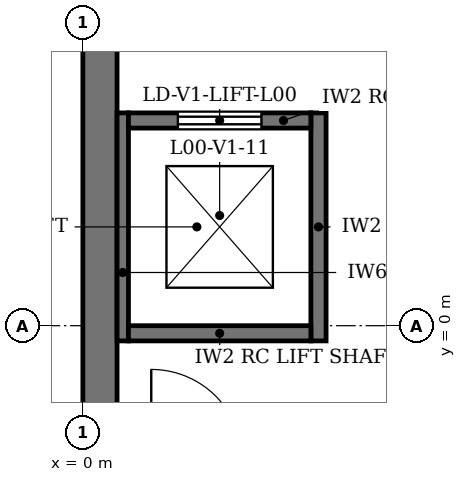
"""IFC4 building model, lengths in metres.
Left out: names, types, materials, properties, quantities, classifications, styles, units other than length and angle.
Written with IfcOpenShell. Run it as: python <this file> out.ifc"""

import sys

from ifc_helpers import new_model, si_unit, direction, frame, frame_2d, origin, place, context, subcontext, project, spatial, rectangle, extrude, element, fill, save


model = new_model("IFC4")
c1 = context("Model", 3, precision=1e-05, world=origin(), true_north=direction((0.0, 1.0)))
c2 = subcontext(c1, "Body", "Model", "MODEL_VIEW")
j1 = project(units=[si_unit("LENGTHUNIT", "METRE"), si_unit("PLANEANGLEUNIT", "RADIAN")], contexts=[c1])
p1 = place(None, origin())
s1 = spatial("IfcSite", under=j1, at=p1, CompositionType="ELEMENT")
p2 = place(p1, origin())
s2 = spatial("IfcBuilding", under=s1, at=p2, CompositionType="ELEMENT")
p3 = place(p2, origin())
s3 = spatial("IfcBuildingStorey", under=s2, at=p3, CompositionType="ELEMENT", Elevation=0.0)
p4 = place(p3, frame((0.225, -1.55, 0.0), z_axis=(0.0, 0.0, 1.0), x_axis=(0.0, 1.0, 0.0)))
e1 = element("IfcWall", 1, at=p4, inside=s3, PredefinedType="SOLIDWALL", context=c2, shape_type="SweptSolid", body=[
    extrude(rectangle(XDim=41.1, YDim=0.45, at=frame_2d((20.55, 0.0))), origin(), (0.0, 0.0, 1.0), 4.8),
])
p5 = place(p4, frame((35.1, 0.0, 0.0)))
e2 = element("IfcOpeningElement", 2, at=p5, cuts=e1, PredefinedType="OPENING", context=c2, shape_type="SweptSolid", body=[
    extrude(rectangle(XDim=1.0, YDim=2.1, at=frame_2d((0.5, 1.05))), frame((0.0, 0.235, 0.0), z_axis=(0.0, -1.0, 0.0), x_axis=(1.0, 0.0, 0.0)), (0.0, 0.0, 1.0), 0.47),
])
p6 = place(p3, frame((0.525, -0.2, 0.0), z_axis=(0.0, 0.0, 1.0), x_axis=(0.0, 1.0, 0.0)))
e3 = element("IfcWall", 3, at=p6, inside=s3, PredefinedType="SOLIDWALL", context=c2, shape_type="SweptSolid", body=[
    extrude(rectangle(XDim=3.0, YDim=0.15, at=frame_2d((1.5, 0.0))), origin(), (0.0, 0.0, 1.0), 3.88),
])
p7 = place(p3, frame((3.1, -0.2, 0.0), z_axis=(0.0, 0.0, 1.0), x_axis=(0.0, 1.0, 0.0)))
e4 = element("IfcWall", 4, at=p7, inside=s3, PredefinedType="SOLIDWALL", context=c2, shape_type="SweptSolid", body=[
    extrude(rectangle(XDim=3.0, YDim=0.2, at=frame_2d((1.5, 0.0))), origin(), (0.0, 0.0, 1.0), 4.55),
])
p8 = place(p3, frame((0.6, -0.1, 0.0), z_axis=(0.0, 0.0, 1.0), x_axis=(1.0, 0.0, 0.0)))
e5 = element("IfcWall", 5, at=p8, inside=s3, PredefinedType="SOLIDWALL", context=c2, shape_type="SweptSolid", body=[
    extrude(rectangle(XDim=2.4, YDim=0.2, at=frame_2d((1.2, 0.0))), origin(), (0.0, 0.0, 1.0), 3.88),
])
p9 = place(p3, frame((0.6, 2.7, 0.0), z_axis=(0.0, 0.0, 1.0), x_axis=(1.0, 0.0, 0.0)))
e6 = element("IfcWall", 6, at=p9, inside=s3, PredefinedType="SOLIDWALL", context=c2, shape_type="SweptSolid", body=[
    extrude(rectangle(XDim=2.4, YDim=0.2, at=frame_2d((1.2, 0.0))), origin(), (0.0, 0.0, 1.0), 3.88),
])
p10 = place(p9, frame((0.65, 0.0, 0.0)))
e7 = element("IfcOpeningElement", 7, at=p10, cuts=e6, PredefinedType="OPENING", context=c2, shape_type="SweptSolid", body=[
    extrude(rectangle(XDim=1.1, YDim=2.1, at=frame_2d((0.55, 1.05))), frame((0.0, 0.11, 0.0), z_axis=(0.0, -1.0, 0.0), x_axis=(1.0, 0.0, 0.0)), (0.0, 0.0, 1.0), 0.22),
])
p11 = place(p10, origin())
e8 = element("IfcDoor", 8, at=p11, inside=s3, OperationType="DOUBLE_DOOR_SLIDING", PredefinedType="DOOR", context=c2, shape_type="SweptSolid", body=[
    extrude(rectangle(XDim=1.1, YDim=2.1, at=frame_2d((0.55, 1.05))), frame((0.0, 0.025, 0.0), z_axis=(0.0, -1.0, 0.0), x_axis=(1.0, 0.0, 0.0)), (0.0, 0.0, 1.0), 0.05),
])
fill(e7, e8)
save(model, sys.argv[1])
